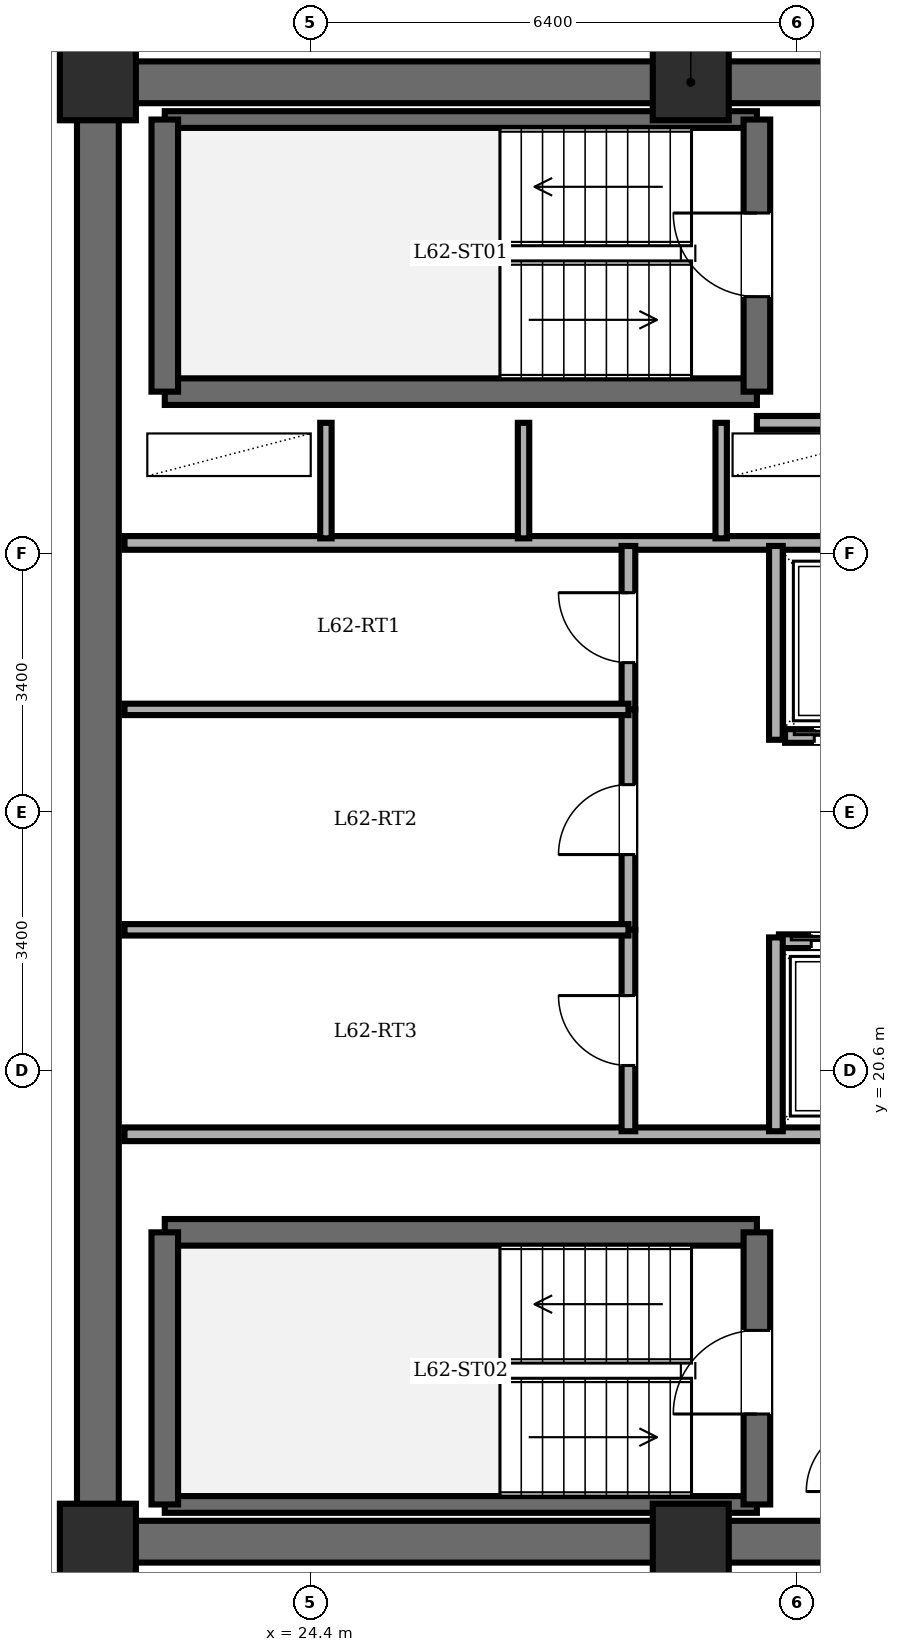
"""IFC4 building model, lengths in metres.
Left out: names, types, materials, properties, quantities, classifications, styles, units other than length and angle.
Written with IfcOpenShell. Run it as: python <this file> out.ifc"""

import sys

from ifc_helpers import new_model, si_unit, direction, frame, frame_2d, origin, origin_2d, place, context, subcontext, project, spatial, rectangle, extrude, element, fill, save


model = new_model("IFC4")
c1 = context("Model", 3, precision=1e-05, world=origin(), true_north=direction((0.0, 1.0)))
c2 = subcontext(c1, "Body", "Model", "MODEL_VIEW")
j1 = project(units=[si_unit("LENGTHUNIT", "METRE"), si_unit("PLANEANGLEUNIT", "RADIAN")], contexts=[c1])
p1 = place(None, origin())
s1 = spatial("IfcSite", under=j1, at=p1, CompositionType="ELEMENT")
p2 = place(p1, origin())
s2 = spatial("IfcBuilding", under=s1, at=p2, CompositionType="ELEMENT")
p3 = place(p2, frame((0.0, 0.0, 237.3)))
s3 = spatial("IfcBuildingStorey", under=s2, at=p3, CompositionType="ELEMENT", Elevation=237.3)
for number, where, z_axis, x_axis in (
    (1, (21.6, 14.4, 0.0), (0.0, 0.0, 1.0), (1.0, 0.0, 0.0)),
    (2, (29.4, 14.4, 0.0), (0.0, 0.0, 1.0), (1.0, 0.0, 0.0)),
    (3, (29.4, 33.6, 0.0), (0.0, 0.0, 1.0), (1.0, 0.0, 0.0)),
    (4, (21.6, 33.6, 0.0), (0.0, 0.0, 1.0), (1.0, 0.0, 0.0)),
):
    element("IfcColumn", number, at=place(p3, frame(where, z_axis=z_axis, x_axis=x_axis)), inside=s3, PredefinedType="COLUMN", context=c2, shape_type="SweptSolid", body=[
        extrude(rectangle(XDim=1.0, YDim=1.0, at=origin_2d()), origin(), (0.0, 0.0, 1.0), 3.6),
    ])
p4 = place(p3, frame((21.6, 14.4, 0.0), z_axis=(0.0, 0.0, 1.0), x_axis=(0.0, 1.0, 0.0)))
e5 = element("IfcWall", 5, at=p4, inside=s3, PredefinedType="SHEAR", context=c2, shape_type="SweptSolid", body=[
    extrude(rectangle(XDim=19.2, YDim=0.55, at=frame_2d((9.6, 0.0))), origin(), (0.0, 0.0, 1.0), 3.4),
])
for number, where, z_axis, x_axis in (
    (6, (21.6, 33.6, 0.0), (0.0, 0.0, 1.0), (1.0, 0.0, 0.0)),
    (7, (37.2, 14.4, 0.0), (0.0, 0.0, 1.0), (-1.0, 0.0, 0.0)),
):
    element("IfcWall", number, at=place(p3, frame(where, z_axis=z_axis, x_axis=x_axis)), inside=s3, PredefinedType="SHEAR", context=c2, shape_type="SweptSolid", body=[
        extrude(rectangle(XDim=15.6, YDim=0.55, at=frame_2d((7.8, 0.0))), origin(), (0.0, 0.0, 1.0), 3.4),
    ])
p5 = place(p3, frame((22.48, 29.53, 0.0), z_axis=(0.0, 0.0, 1.0), x_axis=(1.0, 0.0, 0.0)))
e8 = element("IfcWall", 8, at=p5, inside=s3, PredefinedType="SOLIDWALL", context=c2, shape_type="SweptSolid", body=[
    extrude(rectangle(XDim=7.79, YDim=0.35, at=frame_2d((3.895, 0.0))), origin(), (0.0, 0.0, 1.0), 3.4),
])
p6 = place(p3, frame((22.48, 33.11, 0.0), z_axis=(0.0, 0.0, 1.0), x_axis=(1.0, 0.0, 0.0)))
e9 = element("IfcWall", 9, at=p6, inside=s3, PredefinedType="PARTITIONING", context=c2, shape_type="SweptSolid", body=[
    extrude(rectangle(XDim=7.79, YDim=0.22, at=frame_2d((3.895, 0.0))), origin(), (0.0, 0.0, 1.0), 3.4),
])
p7 = place(p3, frame((22.48, 29.53, 0.0), z_axis=(0.0, 0.0, 1.0), x_axis=(0.0, 1.0, 0.0)))
e10 = element("IfcWall", 10, at=p7, inside=s3, PredefinedType="SOLIDWALL", context=c2, shape_type="SweptSolid", body=[
    extrude(rectangle(XDim=3.58, YDim=0.35, at=frame_2d((1.79, 0.0))), origin(), (0.0, 0.0, 1.0), 3.4),
])
p8 = place(p3, frame((30.27, 29.53, 0.0), z_axis=(0.0, 0.0, 1.0), x_axis=(0.0, 1.0, 0.0)))
e11 = element("IfcWall", 11, at=p8, inside=s3, PredefinedType="SOLIDWALL", context=c2, shape_type="SweptSolid", body=[
    extrude(rectangle(XDim=3.58, YDim=0.35, at=frame_2d((1.79, 0.0))), origin(), (0.0, 0.0, 1.0), 3.4),
])
p9 = place(p8, frame((1.25, 0.0, 0.0)))
e12 = element("IfcOpeningElement", 12, at=p9, cuts=e11, PredefinedType="OPENING", context=c2, shape_type="SweptSolid", body=[
    extrude(rectangle(XDim=1.1, YDim=2.15, at=frame_2d((0.55, 1.075))), frame((0.0, 0.185, 0.0), z_axis=(0.0, -1.0, 0.0), x_axis=(1.0, 0.0, 0.0)), (0.0, 0.0, 1.0), 0.37),
])
p10 = place(p3, frame((22.48, 18.47, 0.0), z_axis=(0.0, 0.0, 1.0), x_axis=(1.0, 0.0, 0.0)))
e13 = element("IfcWall", 13, at=p10, inside=s3, PredefinedType="SOLIDWALL", context=c2, shape_type="SweptSolid", body=[
    extrude(rectangle(XDim=7.79, YDim=0.35, at=frame_2d((3.895, 0.0))), origin(), (0.0, 0.0, 1.0), 3.4),
])
p11 = place(p3, frame((22.48, 14.89, 0.0), z_axis=(0.0, 0.0, 1.0), x_axis=(1.0, 0.0, 0.0)))
e14 = element("IfcWall", 14, at=p11, inside=s3, PredefinedType="PARTITIONING", context=c2, shape_type="SweptSolid", body=[
    extrude(rectangle(XDim=7.79, YDim=0.22, at=frame_2d((3.895, 0.0))), origin(), (0.0, 0.0, 1.0), 3.4),
])
p12 = place(p3, frame((22.48, 14.89, 0.0), z_axis=(0.0, 0.0, 1.0), x_axis=(0.0, 1.0, 0.0)))
e15 = element("IfcWall", 15, at=p12, inside=s3, PredefinedType="SOLIDWALL", context=c2, shape_type="SweptSolid", body=[
    extrude(rectangle(XDim=3.58, YDim=0.35, at=frame_2d((1.79, 0.0))), origin(), (0.0, 0.0, 1.0), 3.4),
])
p13 = place(p3, frame((30.27, 14.89, 0.0), z_axis=(0.0, 0.0, 1.0), x_axis=(0.0, 1.0, 0.0)))
e16 = element("IfcWall", 16, at=p13, inside=s3, PredefinedType="SOLIDWALL", context=c2, shape_type="SweptSolid", body=[
    extrude(rectangle(XDim=3.58, YDim=0.35, at=frame_2d((1.79, 0.0))), origin(), (0.0, 0.0, 1.0), 3.4),
])
p14 = place(p13, frame((1.19, 0.0, 0.0)))
e17 = element("IfcOpeningElement", 17, at=p14, cuts=e16, PredefinedType="OPENING", context=c2, shape_type="SweptSolid", body=[
    extrude(rectangle(XDim=1.1, YDim=2.15, at=frame_2d((0.55, 1.075))), frame((0.0, 0.185, 0.0), z_axis=(0.0, -1.0, 0.0), x_axis=(1.0, 0.0, 0.0)), (0.0, 0.0, 1.0), 0.37),
])
p15 = place(p3, frame((30.27, 29.12, 0.0), z_axis=(0.0, 0.0, 1.0), x_axis=(1.0, 0.0, 0.0)))
e18 = element("IfcWall", 18, at=p15, inside=s3, PredefinedType="PARTITIONING", context=c2, shape_type="SweptSolid", body=[
    extrude(rectangle(XDim=2.24, YDim=0.18, at=frame_2d((1.12, 0.0))), origin(), (0.0, 0.0, 1.0), 3.4),
])
p16 = place(p3, frame((21.95, 27.54, 0.0), z_axis=(0.0, 0.0, 1.0), x_axis=(1.0, 0.0, 0.0)))
e19 = element("IfcWall", 19, at=p16, inside=s3, PredefinedType="PARTITIONING", context=c2, shape_type="SweptSolid", body=[
    extrude(rectangle(XDim=10.56, YDim=0.18, at=frame_2d((5.28, 0.0))), origin(), (0.0, 0.0, 1.0), 3.4),
])
for number, where, z_axis, x_axis in (
    (20, (24.6, 27.6, 0.0), (0.0, 0.0, 1.0), (0.0, 1.0, 0.0)),
    (21, (27.2, 27.6, 0.0), (0.0, 0.0, 1.0), (0.0, 1.0, 0.0)),
    (22, (29.8, 27.6, 0.0), (0.0, 0.0, 1.0), (0.0, 1.0, 0.0)),
):
    element("IfcWall", number, at=place(p3, frame(where, z_axis=z_axis, x_axis=x_axis)), inside=s3, PredefinedType="PARTITIONING", context=c2, shape_type="SweptSolid", body=[
        extrude(rectangle(XDim=1.52, YDim=0.15, at=frame_2d((0.76, 0.0))), origin(), (0.0, 0.0, 1.0), 3.4),
    ])
p17 = place(p3, frame((21.95, 19.76, 0.0), z_axis=(0.0, 0.0, 1.0), x_axis=(1.0, 0.0, 0.0)))
e23 = element("IfcWall", 23, at=p17, inside=s3, PredefinedType="PARTITIONING", context=c2, shape_type="SweptSolid", body=[
    extrude(rectangle(XDim=14.87, YDim=0.18, at=frame_2d((7.435, 0.0))), origin(), (0.0, 0.0, 1.0), 3.4),
])
p18 = place(p3, frame((32.46, 25.0, 0.0), z_axis=(0.0, 0.0, 1.0), x_axis=(-1.0, 0.0, 0.0)))
e24 = element("IfcWall", 24, at=p18, inside=s3, PredefinedType="PARTITIONING", context=c2, shape_type="SweptSolid", body=[
    extrude(rectangle(XDim=1.82, YDim=0.18, at=frame_2d((0.91, 0.0))), origin(), (0.0, 0.0, 1.0), 3.4),
])
p19 = place(p18, frame((0.385, 0.0, 0.0)))
e25 = element("IfcOpeningElement", 25, at=p19, cuts=e24, PredefinedType="OPENING", context=c2, shape_type="SweptSolid", body=[
    extrude(rectangle(XDim=1.05, YDim=2.2, at=frame_2d((0.525, 1.1))), frame((0.0, 0.1, 0.0), z_axis=(0.0, -1.0, 0.0), x_axis=(1.0, 0.0, 0.0)), (0.0, 0.0, 1.0), 0.2),
])
p20 = place(p3, frame((30.56, 22.3, 0.0), z_axis=(0.0, 0.0, 1.0), x_axis=(1.0, 0.0, 0.0)))
e26 = element("IfcWall", 26, at=p20, inside=s3, PredefinedType="PARTITIONING", context=c2, shape_type="SweptSolid", body=[
    extrude(rectangle(XDim=1.9, YDim=0.18, at=frame_2d((0.95, 0.0))), origin(), (0.0, 0.0, 1.0), 3.4),
])
p21 = place(p20, frame((0.425, 0.0, 0.0)))
e27 = element("IfcOpeningElement", 27, at=p21, cuts=e26, PredefinedType="OPENING", context=c2, shape_type="SweptSolid", body=[
    extrude(rectangle(XDim=1.05, YDim=2.2, at=frame_2d((0.525, 1.1))), frame((0.0, 0.1, 0.0), z_axis=(0.0, -1.0, 0.0), x_axis=(1.0, 0.0, 0.0)), (0.0, 0.0, 1.0), 0.2),
])
for number, where, z_axis, x_axis in (
    (28, (30.52, 24.95, 0.0), (0.0, 0.0, 1.0), (0.0, 1.0, 0.0)),
    (29, (30.52, 19.8, 0.0), (0.0, 0.0, 1.0), (0.0, 1.0, 0.0)),
):
    element("IfcWall", number, at=place(p3, frame(where, z_axis=z_axis, x_axis=x_axis)), inside=s3, PredefinedType="PARTITIONING", context=c2, shape_type="SweptSolid", body=[
        extrude(rectangle(XDim=2.55, YDim=0.18, at=frame_2d((1.275, 0.0))), origin(), (0.0, 0.0, 1.0), 3.4),
    ])
p22 = place(p3, frame((28.58, 25.35, 0.0), z_axis=(0.0, 0.0, 1.0), x_axis=(0.0, 1.0, 0.0)))
e30 = element("IfcWall", 30, at=p22, inside=s3, PredefinedType="PARTITIONING", context=c2, shape_type="SweptSolid", body=[
    extrude(rectangle(XDim=2.15, YDim=0.18, at=frame_2d((1.075, 0.0))), origin(), (0.0, 0.0, 1.0), 3.4),
])
p23 = place(p22, frame((0.615, 0.0, 0.0)))
e31 = element("IfcOpeningElement", 31, at=p23, cuts=e30, PredefinedType="OPENING", context=c2, shape_type="SweptSolid", body=[
    extrude(rectangle(XDim=0.92, YDim=2.1, at=frame_2d((0.46, 1.05))), frame((0.0, 0.1, 0.0), z_axis=(0.0, -1.0, 0.0), x_axis=(1.0, 0.0, 0.0)), (0.0, 0.0, 1.0), 0.2),
])
p24 = place(p3, frame((28.58, 22.45, 0.0), z_axis=(0.0, 0.0, 1.0), x_axis=(0.0, 1.0, 0.0)))
e32 = element("IfcWall", 32, at=p24, inside=s3, PredefinedType="PARTITIONING", context=c2, shape_type="SweptSolid", body=[
    extrude(rectangle(XDim=2.9, YDim=0.18, at=frame_2d((1.45, 0.0))), origin(), (0.0, 0.0, 1.0), 3.4),
])
p25 = place(p24, frame((0.99, 0.0, 0.0)))
e33 = element("IfcOpeningElement", 33, at=p25, cuts=e32, PredefinedType="OPENING", context=c2, shape_type="SweptSolid", body=[
    extrude(rectangle(XDim=0.92, YDim=2.1, at=frame_2d((0.46, 1.05))), frame((0.0, 0.1, 0.0), z_axis=(0.0, -1.0, 0.0), x_axis=(1.0, 0.0, 0.0)), (0.0, 0.0, 1.0), 0.2),
])
p26 = place(p3, frame((28.58, 19.8, 0.0), z_axis=(0.0, 0.0, 1.0), x_axis=(0.0, 1.0, 0.0)))
e34 = element("IfcWall", 34, at=p26, inside=s3, PredefinedType="PARTITIONING", context=c2, shape_type="SweptSolid", body=[
    extrude(rectangle(XDim=2.65, YDim=0.18, at=frame_2d((1.325, 0.0))), origin(), (0.0, 0.0, 1.0), 3.4),
])
p27 = place(p26, frame((0.865, 0.0, 0.0)))
e35 = element("IfcOpeningElement", 35, at=p27, cuts=e34, PredefinedType="OPENING", context=c2, shape_type="SweptSolid", body=[
    extrude(rectangle(XDim=0.92, YDim=2.1, at=frame_2d((0.46, 1.05))), frame((0.0, 0.1, 0.0), z_axis=(0.0, -1.0, 0.0), x_axis=(1.0, 0.0, 0.0)), (0.0, 0.0, 1.0), 0.2),
])
for number, where, z_axis, x_axis in (
    (36, (21.95, 25.35, 0.0), (0.0, 0.0, 1.0), (1.0, 0.0, 0.0)),
    (37, (21.95, 22.45, 0.0), (0.0, 0.0, 1.0), (1.0, 0.0, 0.0)),
):
    element("IfcWall", number, at=place(p3, frame(where, z_axis=z_axis, x_axis=x_axis)), inside=s3, PredefinedType="PARTITIONING", context=c2, shape_type="SweptSolid", body=[
        extrude(rectangle(XDim=6.63, YDim=0.15, at=frame_2d((3.315, 0.0))), origin(), (0.0, 0.0, 1.0), 3.4),
    ])
p28 = place(p9, origin())
e38 = element("IfcDoor", 38, at=p28, inside=s3, OperationType="SINGLE_SWING_RIGHT", PredefinedType="DOOR", context=c2, shape_type="SweptSolid", body=[
    extrude(rectangle(XDim=1.1, YDim=2.15, at=frame_2d((0.55, 1.075))), frame((0.0, 0.025, 0.0), z_axis=(0.0, -1.0, 0.0), x_axis=(1.0, 0.0, 0.0)), (0.0, 0.0, 1.0), 0.05),
])
fill(e12, e38)
p29 = place(p14, origin())
e39 = element("IfcDoor", 39, at=p29, inside=s3, OperationType="SINGLE_SWING_LEFT", PredefinedType="DOOR", context=c2, shape_type="SweptSolid", body=[
    extrude(rectangle(XDim=1.1, YDim=2.15, at=frame_2d((0.55, 1.075))), frame((0.0, 0.025, 0.0), z_axis=(0.0, -1.0, 0.0), x_axis=(1.0, 0.0, 0.0)), (0.0, 0.0, 1.0), 0.05),
])
fill(e17, e39)
p30 = place(p19, origin())
e40 = element("IfcDoor", 40, at=p30, inside=s3, OperationType="DOUBLE_DOOR_SLIDING", PredefinedType="DOOR", context=c2, shape_type="SweptSolid", body=[
    extrude(rectangle(XDim=1.05, YDim=2.2, at=frame_2d((0.525, 1.1))), frame((0.0, 0.025, 0.0), z_axis=(0.0, -1.0, 0.0), x_axis=(1.0, 0.0, 0.0)), (0.0, 0.0, 1.0), 0.05),
])
fill(e25, e40)
p31 = place(p21, origin())
e41 = element("IfcDoor", 41, at=p31, inside=s3, OperationType="DOUBLE_DOOR_SLIDING", PredefinedType="DOOR", context=c2, shape_type="SweptSolid", body=[
    extrude(rectangle(XDim=1.05, YDim=2.2, at=frame_2d((0.525, 1.1))), frame((0.0, 0.025, 0.0), z_axis=(0.0, -1.0, 0.0), x_axis=(1.0, 0.0, 0.0)), (0.0, 0.0, 1.0), 0.05),
])
fill(e27, e41)
p32 = place(p23, origin())
e42 = element("IfcDoor", 42, at=p32, inside=s3, OperationType="SINGLE_SWING_RIGHT", PredefinedType="DOOR", context=c2, shape_type="SweptSolid", body=[
    extrude(rectangle(XDim=0.92, YDim=2.1, at=frame_2d((0.46, 1.05))), frame((0.0, 0.025, 0.0), z_axis=(0.0, -1.0, 0.0), x_axis=(1.0, 0.0, 0.0)), (0.0, 0.0, 1.0), 0.05),
])
fill(e31, e42)
p33 = place(p25, origin())
e43 = element("IfcDoor", 43, at=p33, inside=s3, OperationType="SINGLE_SWING_LEFT", PredefinedType="DOOR", context=c2, shape_type="SweptSolid", body=[
    extrude(rectangle(XDim=0.92, YDim=2.1, at=frame_2d((0.46, 1.05))), frame((0.0, 0.025, 0.0), z_axis=(0.0, -1.0, 0.0), x_axis=(1.0, 0.0, 0.0)), (0.0, 0.0, 1.0), 0.05),
])
fill(e33, e43)
p34 = place(p27, origin())
e44 = element("IfcDoor", 44, at=p34, inside=s3, OperationType="SINGLE_SWING_RIGHT", PredefinedType="DOOR", context=c2, shape_type="SweptSolid", body=[
    extrude(rectangle(XDim=0.92, YDim=2.1, at=frame_2d((0.46, 1.05))), frame((0.0, 0.025, 0.0), z_axis=(0.0, -1.0, 0.0), x_axis=(1.0, 0.0, 0.0)), (0.0, 0.0, 1.0), 0.05),
])
fill(e35, e44)
save(model, sys.argv[1])
